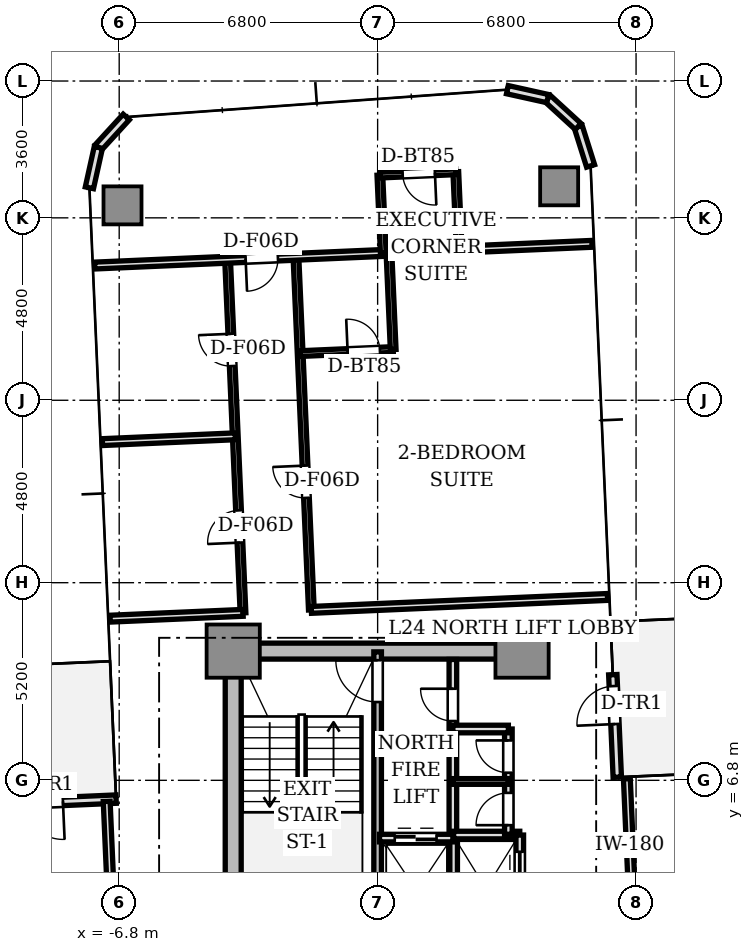
"""IFC4 building model, lengths in metres.
Left out: names, types, materials, properties, quantities, classifications, styles, units other than length and angle.
Written with IfcOpenShell. Run it as: python <this file> out.ifc"""

import sys

from ifc_helpers import new_model, si_unit, direction, frame, frame_2d, origin, origin_2d, place, context, subcontext, project, spatial, rectangle, extrude, source, transform, mapped, element, fill, save


model = new_model("IFC4")
c1 = context("Model", 3, precision=1e-05, world=origin(), true_north=direction((0.0, 1.0)))
c2 = subcontext(c1, "Body", "Model", "MODEL_VIEW")
j1 = project(units=[si_unit("LENGTHUNIT", "METRE"), si_unit("PLANEANGLEUNIT", "RADIAN")], contexts=[c1])
p1 = place(None, origin())
s1 = spatial("IfcSite", under=j1, at=p1, CompositionType="ELEMENT")
p2 = place(p1, origin())
s2 = spatial("IfcBuilding", under=s1, at=p2, CompositionType="ELEMENT")
p3 = place(p2, frame((0.0, 0.0, 90.2)))
s3 = spatial("IfcBuildingStorey", under=s2, at=p3, CompositionType="ELEMENT", Elevation=90.2)
p4 = place(p3, frame((-3.55, 10.2, 0.0), z_axis=(0.0, 0.0, 1.0), x_axis=(1.0, 0.0, 0.0)))
e1 = element("IfcWall", 1, at=p4, inside=s3, PredefinedType="SHEAR", context=c2, shape_type="SweptSolid", body=[
    extrude(rectangle(XDim=7.1, YDim=0.42, at=frame_2d((3.55, 0.0))), origin(), (0.0, 0.0, 1.0), 3.11),
])
p5 = place(p3, frame((-3.8, 2.85, 0.0), z_axis=(0.0, 0.0, 1.0), x_axis=(0.0, 1.0, 0.0)))
e2 = element("IfcWall", 2, at=p5, inside=s3, PredefinedType="SHEAR", context=c2, shape_type="SweptSolid", body=[
    extrude(rectangle(XDim=6.9, YDim=0.42, at=frame_2d((3.45, 0.0))), origin(), (0.0, 0.0, 1.0), 3.11),
])
m1 = source(origin(), c2, "Body", "SweptSolid", [
    extrude(rectangle(XDim=1.4, YDim=1.4, at=origin_2d()), origin(), (0.0, 0.0, 1.0), 3.11),
])
for number, where, z_axis, x_axis in (
    (3, (-3.8, 10.2, 0.0), (0.0, 0.0, 1.0), (1.0, 0.0, 0.0)),
    (4, (3.8, 10.2, 0.0), (0.0, 0.0, 1.0), (1.0, 0.0, 0.0)),
):
    element("IfcColumn", number, at=place(p3, frame(where, z_axis=z_axis, x_axis=x_axis)), inside=s3, PredefinedType="COLUMN", context=c2, shape_type="MappedRepresentation", body=[
        mapped(m1, transform((0.0, 0.0, 0.0), scale=1.0)),
    ])
m2 = source(origin(), c2, "Body", "SweptSolid", [
    extrude(rectangle(XDim=1.0, YDim=1.0, at=origin_2d()), origin(), (0.0, 0.0, 1.0), 3.11),
])
for number, where, z_axis, x_axis in (
    (5, (4.776, 22.43, 0.0), (0.0, 0.0, 1.0), (1.0, 0.0, 0.0)),
    (6, (-6.713, 21.928, 0.0), (0.0, 0.0, 1.0), (1.0, 0.0, 0.0)),
):
    element("IfcColumn", number, at=place(p3, frame(where, z_axis=z_axis, x_axis=x_axis)), inside=s3, PredefinedType="COLUMN", context=c2, shape_type="MappedRepresentation", body=[
        mapped(m2, transform((0.0, 0.0, 0.0), scale=1.0)),
    ])
p6 = place(p3, frame((6.306, 6.882, 0.0), z_axis=(0.0, 0.0, 1.0), x_axis=(-0.043672655174, 0.999045894436, 0.0)))
e7 = element("IfcWall", 7, at=p6, inside=s3, PredefinedType="STANDARD", context=c2, shape_type="SweptSolid", body=[
    extrude(rectangle(XDim=2.7, YDim=0.22, at=frame_2d((1.35, 0.0))), origin(), (0.0, 0.0, 1.0), 3.11),
])
p7 = place(p6, frame((1.4, 0.0, 0.0)))
e8 = element("IfcOpeningElement", 8, at=p7, cuts=e7, PredefinedType="OPENING", context=c2, shape_type="SweptSolid", body=[
    extrude(rectangle(XDim=1.0, YDim=2.2, at=frame_2d((0.5, 1.1))), frame((0.0, 0.12, 0.0), z_axis=(0.0, -1.0, 0.0), x_axis=(1.0, 0.0, 0.0)), (0.0, 0.0, 1.0), 0.24),
])
p8 = place(p3, frame((5.604, 22.966, 0.0), z_axis=(0.0, 0.0, 1.0), x_axis=(-0.300755105707, 0.953701403161, 0.0)))
e9 = element("IfcWall", 9, at=p8, inside=s3, PredefinedType="STANDARD", context=c2, shape_type="SweptSolid", body=[
    extrude(rectangle(XDim=1.087, YDim=0.22, at=frame_2d((0.543, 0.0))), origin(), (0.0, 0.0, 1.0), 3.11),
])
p9 = place(p3, frame((5.277, 24.003, 0.0), z_axis=(0.0, 0.0, 1.0), x_axis=(-0.737312600672, 0.675551721847, 0.0)))
e10 = element("IfcWall", 10, at=p9, inside=s3, PredefinedType="STANDARD", context=c2, shape_type="SweptSolid", body=[
    extrude(rectangle(XDim=1.087, YDim=0.22, at=frame_2d((0.543, 0.0))), origin(), (0.0, 0.0, 1.0), 3.11),
])
for number, where, z_axis, x_axis in (
    (11, (4.475, 24.737, 0.0), (0.0, 0.0, 1.0), (-0.976, 0.217, 0.0)),
    (12, (-6.614, 24.253, 0.0), (0.0, 0.0, 1.0), (-0.676, -0.737, 0.0)),
):
    element("IfcWall", number, at=place(p3, frame(where, z_axis=z_axis, x_axis=x_axis)), inside=s3, PredefinedType="STANDARD", context=c2, shape_type="SweptSolid", body=[
        extrude(rectangle(XDim=1.087, YDim=0.22, at=frame_2d((0.543, 0.0))), origin(), (0.0, 0.0, 1.0), 3.11),
    ])
p10 = place(p3, frame((-7.349, 23.452, 0.0), z_axis=(0.0, 0.0, 1.0), x_axis=(-0.216454939174, -0.976292609471, 0.0)))
e13 = element("IfcWall", 13, at=p10, inside=s3, PredefinedType="STANDARD", context=c2, shape_type="SweptSolid", body=[
    extrude(rectangle(XDim=1.087, YDim=0.22, at=frame_2d((0.544, 0.0))), origin(), (0.0, 0.0, 1.0), 3.11),
])
p11 = place(p3, frame((-6.882, 6.306, 0.0), z_axis=(0.0, 0.0, 1.0), x_axis=(-0.999045894436, -0.043672655174, 0.0)))
e14 = element("IfcWall", 14, at=p11, inside=s3, PredefinedType="STANDARD", context=c2, shape_type="SweptSolid", body=[
    extrude(rectangle(XDim=2.7, YDim=0.22, at=frame_2d((1.35, 0.0))), origin(), (0.0, 0.0, 1.0), 3.11),
])
p12 = place(p11, frame((1.4, 0.0, 0.0)))
e15 = element("IfcOpeningElement", 15, at=p12, cuts=e14, PredefinedType="OPENING", context=c2, shape_type="SweptSolid", body=[
    extrude(rectangle(XDim=1.0, YDim=2.2, at=frame_2d((0.5, 1.1))), frame((0.0, 0.12, 0.0), z_axis=(0.0, -1.0, 0.0), x_axis=(1.0, 0.0, 0.0)), (0.0, 0.0, 1.0), 0.24),
])
p13 = place(p3, frame((0.0, 2.5, 0.0), z_axis=(0.0, 0.0, 1.0), x_axis=(0.0, 1.0, 0.0)))
e16 = element("IfcWall", 16, at=p13, inside=s3, PredefinedType="SOLIDWALL", context=c2, shape_type="SweptSolid", body=[
    extrude(rectangle(XDim=7.68, YDim=0.2, at=frame_2d((3.84, 0.0))), origin(), (0.0, 0.0, 1.0), 3.11),
])
p14 = place(p13, frame((6.36, 0.0, 0.0)))
e17 = element("IfcOpeningElement", 17, at=p14, cuts=e16, PredefinedType="OPENING", context=c2, shape_type="SweptSolid", body=[
    extrude(rectangle(XDim=1.1, YDim=2.15, at=frame_2d((0.55, 1.075))), frame((0.0, 0.11, 0.0), z_axis=(0.0, -1.0, 0.0), x_axis=(1.0, 0.0, 0.0)), (0.0, 0.0, 1.0), 0.22),
])
p15 = place(p3, frame((1.98, 5.32, 0.0), z_axis=(0.0, 0.0, 1.0), x_axis=(0.0, 1.0, 0.0)))
e18 = element("IfcWall", 18, at=p15, inside=s3, PredefinedType="SOLIDWALL", context=c2, shape_type="SweptSolid", body=[
    extrude(rectangle(XDim=4.66, YDim=0.2, at=frame_2d((2.33, 0.0))), origin(), (0.0, 0.0, 1.0), 2.66),
])
p16 = place(p15, frame((3.04, 0.0, 0.0)))
e19 = element("IfcOpeningElement", 19, at=p16, cuts=e18, PredefinedType="OPENING", context=c2, shape_type="SweptSolid", body=[
    extrude(rectangle(XDim=0.85, YDim=2.1, at=frame_2d((0.425, 1.05))), frame((0.0, 0.11, 0.0), z_axis=(0.0, -1.0, 0.0), x_axis=(1.0, 0.0, 0.0)), (0.0, 0.0, 1.0), 0.22),
])
p17 = place(p3, frame((2.0, 2.5, 0.0), z_axis=(0.0, 0.0, 1.0), x_axis=(0.0, 1.0, 0.0)))
e20 = element("IfcWall", 20, at=p17, inside=s3, PredefinedType="SOLIDWALL", context=c2, shape_type="SweptSolid", body=[
    extrude(rectangle(XDim=2.78, YDim=0.2, at=frame_2d((1.39, 0.0))), origin(), (0.0, 0.0, 1.0), 2.66),
])
p18 = place(p3, frame((0.05, 5.28, 0.0), z_axis=(0.0, 0.0, 1.0), x_axis=(1.0, 0.0, 0.0)))
e21 = element("IfcWall", 21, at=p18, inside=s3, PredefinedType="SOLIDWALL", context=c2, shape_type="SweptSolid", body=[
    extrude(rectangle(XDim=1.93, YDim=0.2, at=frame_2d((0.965, 0.0))), origin(), (0.0, 0.0, 1.0), 2.66),
])
p19 = place(p18, frame((0.4, 0.0, 0.0)))
e22 = element("IfcOpeningElement", 22, at=p19, cuts=e21, PredefinedType="OPENING", context=c2, shape_type="SweptSolid", body=[
    extrude(rectangle(XDim=1.1, YDim=2.2, at=frame_2d((0.55, 1.1))), frame((0.0, 0.11, 0.0), z_axis=(0.0, -1.0, 0.0), x_axis=(1.0, 0.0, 0.0)), (0.0, 0.0, 1.0), 0.22),
])
p20 = place(p3, frame((2.0, 5.36, 0.0), z_axis=(0.0, 0.0, 1.0), x_axis=(1.0, 0.0, 0.0)))
e23 = element("IfcWall", 23, at=p20, inside=s3, PredefinedType="SOLIDWALL", context=c2, shape_type="SweptSolid", body=[
    extrude(rectangle(XDim=1.74, YDim=0.2, at=frame_2d((0.87, 0.0))), origin(), (0.0, 0.0, 1.0), 2.66),
])
p21 = place(p3, frame((3.74, 3.28, 0.0), z_axis=(0.0, 0.0, 1.0), x_axis=(0.0, 1.0, 0.0)))
e24 = element("IfcWall", 24, at=p21, inside=s3, PredefinedType="SOLIDWALL", context=c2, shape_type="SweptSolid", body=[
    extrude(rectangle(XDim=2.08, YDim=0.2, at=frame_2d((1.04, 0.0))), origin(), (0.0, 0.0, 1.0), 2.66),
])
p22 = place(p21, frame((0.44, 0.0, 0.0)))
e25 = element("IfcOpeningElement", 25, at=p22, cuts=e24, PredefinedType="OPENING", context=c2, shape_type="SweptSolid", body=[
    extrude(rectangle(XDim=1.2, YDim=2.2, at=frame_2d((0.6, 1.1))), frame((0.0, 0.11, 0.0), z_axis=(0.0, -1.0, 0.0), x_axis=(1.0, 0.0, 0.0)), (0.0, 0.0, 1.0), 0.22),
])
p23 = place(p3, frame((3.44, 5.38, 0.0), z_axis=(0.0, 0.0, 1.0), x_axis=(0.0, 1.0, 0.0)))
e26 = element("IfcWall", 26, at=p23, inside=s3, PredefinedType="SOLIDWALL", context=c2, shape_type="SweptSolid", body=[
    extrude(rectangle(XDim=2.77, YDim=0.2, at=frame_2d((1.385, 0.0))), origin(), (0.0, 0.0, 1.0), 2.66),
])
p24 = place(p23, frame((0.24, 0.0, 0.0)))
e27 = element("IfcOpeningElement", 27, at=p24, cuts=e26, PredefinedType="OPENING", context=c2, shape_type="SweptSolid", body=[
    extrude(rectangle(XDim=0.85, YDim=2.1, at=frame_2d((0.425, 1.05))), frame((0.0, 0.11, 0.0), z_axis=(0.0, -1.0, 0.0), x_axis=(1.0, 0.0, 0.0)), (0.0, 0.0, 1.0), 0.22),
])
p25 = place(p23, frame((1.62, 0.0, 0.0)))
e28 = element("IfcOpeningElement", 28, at=p25, cuts=e26, PredefinedType="OPENING", context=c2, shape_type="SweptSolid", body=[
    extrude(rectangle(XDim=0.85, YDim=2.1, at=frame_2d((0.425, 1.05))), frame((0.0, 0.11, 0.0), z_axis=(0.0, -1.0, 0.0), x_axis=(1.0, 0.0, 0.0)), (0.0, 0.0, 1.0), 0.22),
])
p26 = place(p3, frame((1.98, 8.15, 0.0), z_axis=(0.0, 0.0, 1.0), x_axis=(1.0, 0.0, 0.0)))
e29 = element("IfcWall", 29, at=p26, inside=s3, PredefinedType="SOLIDWALL", context=c2, shape_type="SweptSolid", body=[
    extrude(rectangle(XDim=1.46, YDim=0.2, at=frame_2d((0.73, 0.0))), origin(), (0.0, 0.0, 1.0), 2.66),
])
p27 = place(p3, frame((1.98, 6.77, 0.0), z_axis=(0.0, 0.0, 1.0), x_axis=(1.0, 0.0, 0.0)))
e30 = element("IfcWall", 30, at=p27, inside=s3, PredefinedType="PARTITIONING", context=c2, shape_type="SweptSolid", body=[
    extrude(rectangle(XDim=1.46, YDim=0.15, at=frame_2d((0.73, 0.0))), origin(), (0.0, 0.0, 1.0), 2.66),
])
p28 = place(p3, frame((6.71, 3.346, 0.0), z_axis=(0.0, 0.0, 1.0), x_axis=(-0.043597663116, 0.999049169846, 0.0)))
e31 = element("IfcWall", 31, at=p28, inside=s3, PredefinedType="PARTITIONING", context=c2, shape_type="SweptSolid", body=[
    extrude(rectangle(XDim=3.5, YDim=0.18, at=frame_2d((1.75, 0.0))), origin(), (0.0, 0.0, 1.0), 2.66),
])
p29 = place(p3, frame((-3.542, 11.206, 0.0), z_axis=(0.0, 0.0, 1.0), x_axis=(-0.043604692074, 0.999048863084, 0.0)))
e32 = element("IfcWall", 32, at=p29, inside=s3, PredefinedType="PARTITIONING", context=c2, shape_type="SweptSolid", body=[
    extrude(rectangle(XDim=9.3, YDim=0.15, at=frame_2d((4.65, 0.0))), origin(), (0.0, 0.0, 1.0), 2.66),
])
p30 = place(p29, frame((1.85, 0.0, 0.0)))
e33 = element("IfcOpeningElement", 33, at=p30, cuts=e32, PredefinedType="OPENING", context=c2, shape_type="SweptSolid", body=[
    extrude(rectangle(XDim=0.85, YDim=2.1, at=frame_2d((0.425, 1.05))), frame((0.0, 0.085, 0.0), z_axis=(0.0, -1.0, 0.0), x_axis=(1.0, 0.0, 0.0)), (0.0, 0.0, 1.0), 0.17),
])
p31 = place(p29, frame((6.5, 0.0, 0.0)))
e34 = element("IfcOpeningElement", 34, at=p31, cuts=e32, PredefinedType="OPENING", context=c2, shape_type="SweptSolid", body=[
    extrude(rectangle(XDim=0.85, YDim=2.1, at=frame_2d((0.425, 1.05))), frame((0.0, 0.085, 0.0), z_axis=(0.0, -1.0, 0.0), x_axis=(1.0, 0.0, 0.0)), (0.0, 0.0, 1.0), 0.17),
])
p32 = place(p3, frame((-1.744, 11.285, 0.0), z_axis=(0.0, 0.0, 1.0), x_axis=(-0.043630894187, 0.999047719117, 0.0)))
e35 = element("IfcWall", 35, at=p32, inside=s3, PredefinedType="PARTITIONING", context=c2, shape_type="SweptSolid", body=[
    extrude(rectangle(XDim=9.3, YDim=0.15, at=frame_2d((4.65, 0.0))), origin(), (0.0, 0.0, 1.0), 2.66),
])
p33 = place(p32, frame((2.95, 0.0, 0.0)))
e36 = element("IfcOpeningElement", 36, at=p33, cuts=e35, PredefinedType="OPENING", context=c2, shape_type="SweptSolid", body=[
    extrude(rectangle(XDim=0.85, YDim=2.1, at=frame_2d((0.425, 1.05))), frame((0.0, 0.085, 0.0), z_axis=(0.0, -1.0, 0.0), x_axis=(1.0, 0.0, 0.0)), (0.0, 0.0, 1.0), 0.17),
])
p34 = place(p3, frame((-3.542, 11.206, 0.0), z_axis=(0.0, 0.0, 1.0), x_axis=(-0.999046129111, -0.04366728647, 0.0)))
e37 = element("IfcWall", 37, at=p34, inside=s3, PredefinedType="PARTITIONING", context=c2, shape_type="SweptSolid", body=[
    extrude(rectangle(XDim=3.5, YDim=0.18, at=frame_2d((1.75, 0.0))), origin(), (0.0, 0.0, 1.0), 2.66),
])
p35 = place(p3, frame((6.049, 11.625, 0.0), z_axis=(0.0, 0.0, 1.0), x_axis=(-0.999047634936, -0.043632821702, 0.0)))
e38 = element("IfcWall", 38, at=p35, inside=s3, PredefinedType="PARTITIONING", context=c2, shape_type="SweptSolid", body=[
    extrude(rectangle(XDim=7.8, YDim=0.18, at=frame_2d((3.9, 0.0))), origin(), (0.0, 0.0, 1.0), 2.66),
])
p36 = place(p3, frame((-3.745, 15.852, 0.0), z_axis=(0.0, 0.0, 1.0), x_axis=(-0.999049169846, -0.043597663116, 0.0)))
e39 = element("IfcWall", 39, at=p36, inside=s3, PredefinedType="PARTITIONING", context=c2, shape_type="SweptSolid", body=[
    extrude(rectangle(XDim=3.5, YDim=0.18, at=frame_2d((1.75, 0.0))), origin(), (0.0, 0.0, 1.0), 2.66),
])
p37 = place(p3, frame((-2.038, 18.028, 0.0), z_axis=(0.0, 0.0, 1.0), x_axis=(0.999051263243, 0.043549666039, 0.0)))
e40 = element("IfcWall", 40, at=p37, inside=s3, PredefinedType="PARTITIONING", context=c2, shape_type="SweptSolid", body=[
    extrude(rectangle(XDim=2.45, YDim=0.15, at=frame_2d((1.225, 0.0))), origin(), (0.0, 0.0, 1.0), 2.66),
])
p38 = place(p37, frame((1.25, 0.0, 0.0)))
e41 = element("IfcOpeningElement", 41, at=p38, cuts=e40, PredefinedType="OPENING", context=c2, shape_type="SweptSolid", body=[
    extrude(rectangle(XDim=0.85, YDim=2.1, at=frame_2d((0.425, 1.05))), frame((0.0, 0.085, 0.0), z_axis=(0.0, -1.0, 0.0), x_axis=(1.0, 0.0, 0.0)), (0.0, 0.0, 1.0), 0.17),
])
p39 = place(p3, frame((0.409, 18.135, 0.0), z_axis=(0.0, 0.0, 1.0), x_axis=(-0.043561867058, 0.999050731314, 0.0)))
e42 = element("IfcWall", 42, at=p39, inside=s3, PredefinedType="PARTITIONING", context=c2, shape_type="SweptSolid", body=[
    extrude(rectangle(XDim=2.55, YDim=0.15, at=frame_2d((1.275, 0.0))), origin(), (0.0, 0.0, 1.0), 2.66),
])
p40 = place(p3, frame((5.643, 20.916, 0.0), z_axis=(0.0, 0.0, 1.0), x_axis=(-0.999047841598, -0.043628089563, 0.0)))
e43 = element("IfcWall", 43, at=p40, inside=s3, PredefinedType="PARTITIONING", context=c2, shape_type="SweptSolid", body=[
    extrude(rectangle(XDim=13.1, YDim=0.18, at=frame_2d((6.55, 0.0))), origin(), (0.0, 0.0, 1.0), 2.66),
])
p41 = place(p40, frame((8.275, 0.0, 0.0)))
e44 = element("IfcOpeningElement", 44, at=p41, cuts=e43, PredefinedType="OPENING", context=c2, shape_type="SweptSolid", body=[
    extrude(rectangle(XDim=0.85, YDim=2.1, at=frame_2d((0.425, 1.05))), frame((0.0, 0.1, 0.0), z_axis=(0.0, -1.0, 0.0), x_axis=(1.0, 0.0, 0.0)), (0.0, 0.0, 1.0), 0.2),
])
p42 = place(p3, frame((0.148, 20.676, 0.0), z_axis=(0.0, 0.0, 1.0), x_axis=(-0.043587097972, 0.999049630844, 0.0)))
e45 = element("IfcWall", 45, at=p42, inside=s3, PredefinedType="PARTITIONING", context=c2, shape_type="SweptSolid", body=[
    extrude(rectangle(XDim=2.05, YDim=0.15, at=frame_2d((1.025, 0.0))), origin(), (0.0, 0.0, 1.0), 2.66),
])
p43 = place(p3, frame((2.146, 20.763, 0.0), z_axis=(0.0, 0.0, 1.0), x_axis=(-0.043711161805, 0.9990442104, 0.0)))
e46 = element("IfcWall", 46, at=p43, inside=s3, PredefinedType="PARTITIONING", context=c2, shape_type="SweptSolid", body=[
    extrude(rectangle(XDim=2.05, YDim=0.15, at=frame_2d((1.025, 0.0))), origin(), (0.0, 0.0, 1.0), 2.66),
])
p44 = place(p3, frame((2.057, 22.811, 0.0), z_axis=(0.0, 0.0, 1.0), x_axis=(-0.999049929275, -0.043580257179, 0.0)))
e47 = element("IfcWall", 47, at=p44, inside=s3, PredefinedType="PARTITIONING", context=c2, shape_type="SweptSolid", body=[
    extrude(rectangle(XDim=2.0, YDim=0.15, at=frame_2d((1.0, 0.0))), origin(), (0.0, 0.0, 1.0), 2.66),
])
p45 = place(p44, frame((0.55, 0.0, 0.0)))
e48 = element("IfcOpeningElement", 48, at=p45, cuts=e47, PredefinedType="OPENING", context=c2, shape_type="SweptSolid", body=[
    extrude(rectangle(XDim=0.85, YDim=2.1, at=frame_2d((0.425, 1.05))), frame((0.0, 0.085, 0.0), z_axis=(0.0, -1.0, 0.0), x_axis=(1.0, 0.0, 0.0)), (0.0, 0.0, 1.0), 0.17),
])
p46 = place(p3, frame((-7.129, 6.245, 0.0), z_axis=(0.0, 0.0, 1.0), x_axis=(0.043600217373, -0.999049058378, 0.0)))
e49 = element("IfcWall", 49, at=p46, inside=s3, PredefinedType="PARTITIONING", context=c2, shape_type="SweptSolid", body=[
    extrude(rectangle(XDim=7.8, YDim=0.18, at=frame_2d((3.9, 0.0))), origin(), (0.0, 0.0, 1.0), 2.66),
])
m3 = source(origin(), c2, "Body", "SweptSolid", [
    extrude(rectangle(XDim=1.0, YDim=0.05, at=origin_2d()), origin(), (0.0, 0.0, 1.0), 2.2),
])
p47 = place(p7, frame((0.5, 0.0, 0.0)))
e50 = element("IfcDoor", 50, at=p47, inside=s3, OperationType="SINGLE_SWING_LEFT", PredefinedType="DOOR", context=c2, shape_type="MappedRepresentation", body=[
    mapped(m3, transform((0.0, 0.0, 0.0), scale=1.0)),
])
fill(e8, e50)
p48 = place(p12, frame((0.5, 0.0, 0.0)))
e51 = element("IfcDoor", 51, at=p48, inside=s3, OperationType="SINGLE_SWING_LEFT", PredefinedType="DOOR", context=c2, shape_type="MappedRepresentation", body=[
    mapped(m3, transform((0.0, 0.0, 0.0), scale=1.0)),
])
fill(e15, e51)
m4 = source(origin(), c2, "Body", "SweptSolid", [
    extrude(rectangle(XDim=1.1, YDim=0.05, at=origin_2d()), origin(), (0.0, 0.0, 1.0), 2.15),
])
p49 = place(p14, frame((0.55, 0.0, 0.0)))
e52 = element("IfcDoor", 52, at=p49, inside=s3, OperationType="SINGLE_SWING_RIGHT", PredefinedType="DOOR", context=c2, shape_type="MappedRepresentation", body=[
    mapped(m4, transform((0.0, 0.0, 0.0), scale=1.0)),
])
fill(e17, e52)
m5 = source(origin(), c2, "Body", "SweptSolid", [
    extrude(rectangle(XDim=0.85, YDim=0.05, at=origin_2d()), origin(), (0.0, 0.0, 1.0), 2.1),
])
p50 = place(p16, frame((0.425, 0.0, 0.0)))
e53 = element("IfcDoor", 53, at=p50, inside=s3, OperationType="SINGLE_SWING_RIGHT", PredefinedType="DOOR", context=c2, shape_type="MappedRepresentation", body=[
    mapped(m5, transform((0.0, 0.0, 0.0), scale=1.0)),
])
fill(e19, e53)
m6 = source(origin(), c2, "Body", "SweptSolid", [
    extrude(rectangle(XDim=1.1, YDim=0.05, at=origin_2d()), origin(), (0.0, 0.0, 1.0), 2.2),
])
p51 = place(p19, frame((0.55, 0.0, 0.0)))
e54 = element("IfcDoor", 54, at=p51, inside=s3, OperationType="DOUBLE_DOOR_SLIDING", PredefinedType="DOOR", context=c2, shape_type="MappedRepresentation", body=[
    mapped(m6, transform((0.0, 0.0, 0.0), scale=1.0)),
])
fill(e22, e54)
m7 = source(origin(), c2, "Body", "SweptSolid", [
    extrude(rectangle(XDim=1.2, YDim=0.05, at=origin_2d()), origin(), (0.0, 0.0, 1.0), 2.2),
])
p52 = place(p22, frame((0.6, 0.0, 0.0)))
e55 = element("IfcDoor", 55, at=p52, inside=s3, OperationType="DOUBLE_DOOR_SLIDING", PredefinedType="DOOR", context=c2, shape_type="MappedRepresentation", body=[
    mapped(m7, transform((0.0, 0.0, 0.0), scale=1.0)),
])
fill(e25, e55)
p53 = place(p24, frame((0.425, 0.0, 0.0)))
e56 = element("IfcDoor", 56, at=p53, inside=s3, OperationType="SINGLE_SWING_LEFT", PredefinedType="DOOR", context=c2, shape_type="MappedRepresentation", body=[
    mapped(m5, transform((0.0, 0.0, 0.0), scale=1.0)),
])
fill(e27, e56)
p54 = place(p25, frame((0.425, 0.0, 0.0)))
e57 = element("IfcDoor", 57, at=p54, inside=s3, OperationType="SINGLE_SWING_RIGHT", PredefinedType="DOOR", context=c2, shape_type="MappedRepresentation", body=[
    mapped(m5, transform((0.0, 0.0, 0.0), scale=1.0)),
])
fill(e28, e57)
p55 = place(p30, frame((0.425, 0.0, 0.0)))
e58 = element("IfcDoor", 58, at=p55, inside=s3, OperationType="SINGLE_SWING_LEFT", PredefinedType="DOOR", context=c2, shape_type="MappedRepresentation", body=[
    mapped(m5, transform((0.0, 0.0, 0.0), scale=1.0)),
])
fill(e33, e58)
p56 = place(p31, frame((0.425, 0.0, 0.0)))
e59 = element("IfcDoor", 59, at=p56, inside=s3, OperationType="SINGLE_SWING_RIGHT", PredefinedType="DOOR", context=c2, shape_type="MappedRepresentation", body=[
    mapped(m5, transform((0.0, 0.0, 0.0), scale=1.0)),
])
fill(e34, e59)
p57 = place(p38, frame((0.425, 0.0, 0.0)))
e60 = element("IfcDoor", 60, at=p57, inside=s3, OperationType="SINGLE_SWING_LEFT", PredefinedType="DOOR", context=c2, shape_type="MappedRepresentation", body=[
    mapped(m5, transform((0.0, 0.0, 0.0), scale=1.0)),
])
fill(e41, e60)
p58 = place(p33, frame((0.425, 0.0, 0.0)))
e61 = element("IfcDoor", 61, at=p58, inside=s3, OperationType="SINGLE_SWING_RIGHT", PredefinedType="DOOR", context=c2, shape_type="MappedRepresentation", body=[
    mapped(m5, transform((0.0, 0.0, 0.0), scale=1.0)),
])
fill(e36, e61)
p59 = place(p45, frame((0.425, 0.0, 0.0)))
e62 = element("IfcDoor", 62, at=p59, inside=s3, OperationType="SINGLE_SWING_LEFT", PredefinedType="DOOR", context=c2, shape_type="MappedRepresentation", body=[
    mapped(m5, transform((0.0, 0.0, 0.0), scale=1.0)),
])
fill(e48, e62)
p60 = place(p41, frame((0.425, 0.0, 0.0)))
e63 = element("IfcDoor", 63, at=p60, inside=s3, OperationType="SINGLE_SWING_RIGHT", PredefinedType="DOOR", context=c2, shape_type="MappedRepresentation", body=[
    mapped(m5, transform((0.0, 0.0, 0.0), scale=1.0)),
])
fill(e44, e63)
save(model, sys.argv[1])
